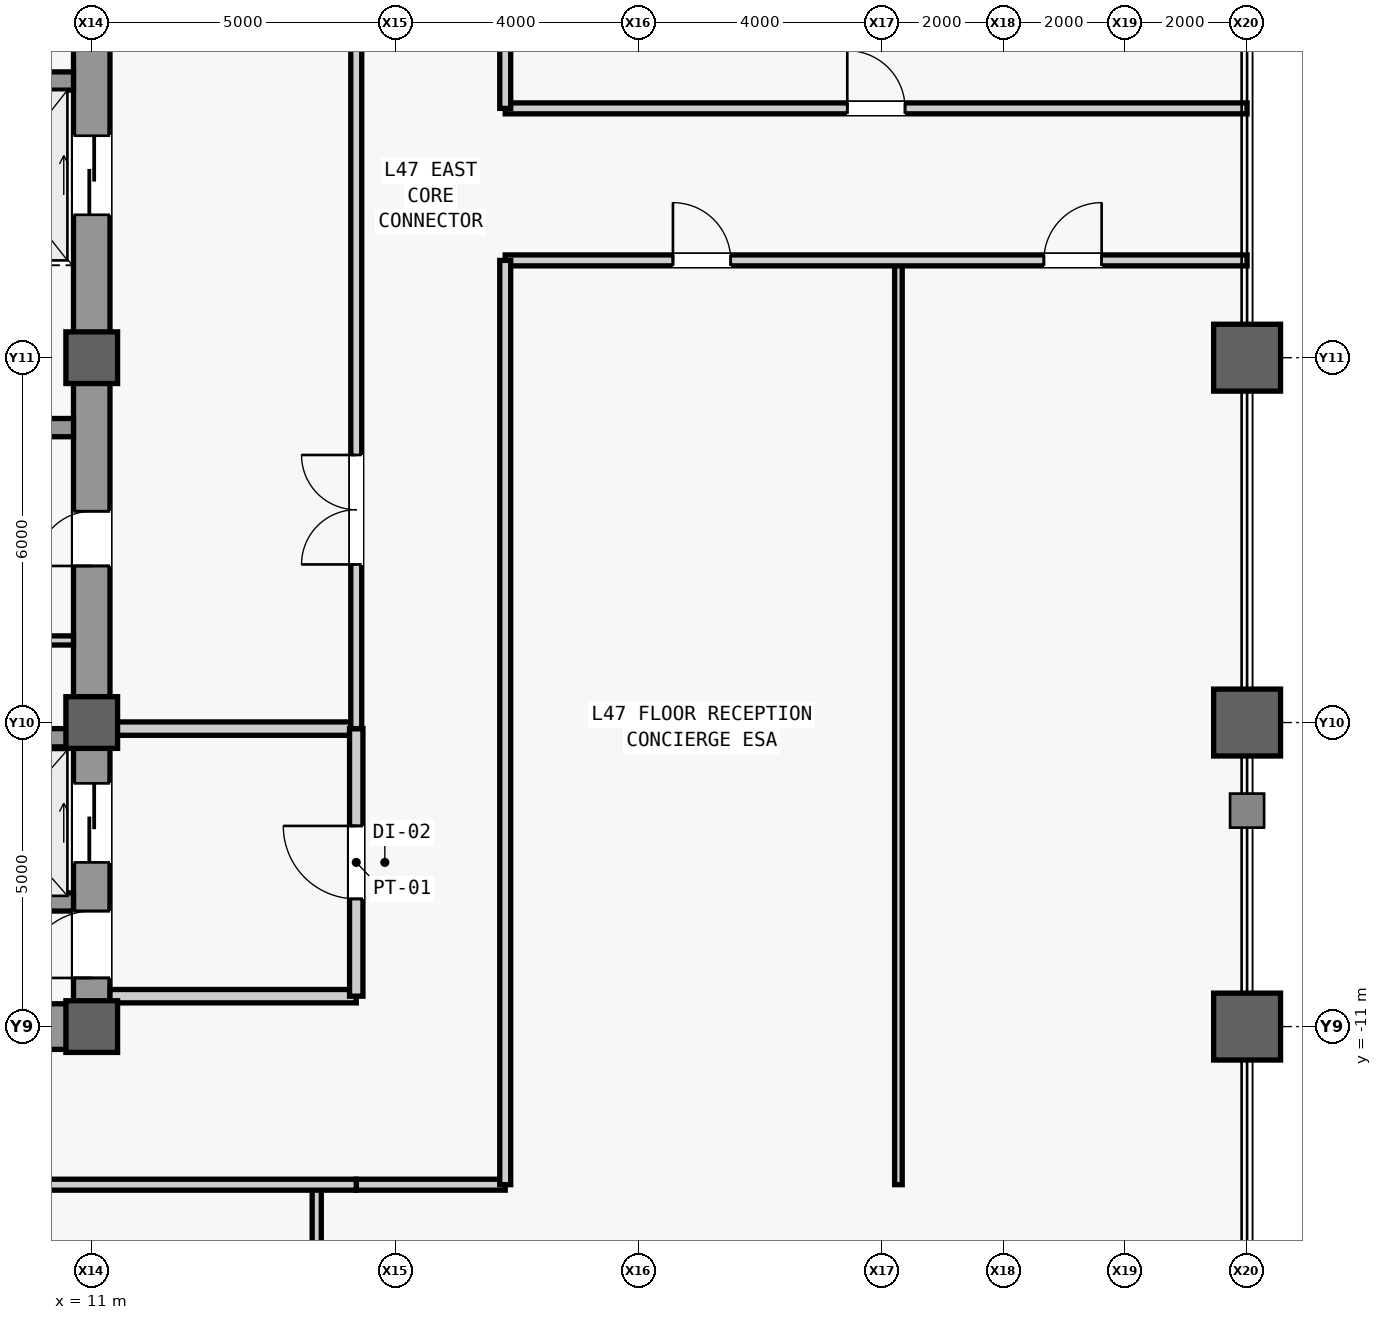
"""IFC4 building model, lengths in metres.
Left out: names, types, materials, properties, quantities, classifications, styles, units other than length and angle.
Written with IfcOpenShell. Run it as: python <this file> out.ifc"""

import sys

from ifc_helpers import new_model, si_unit, direction, frame, frame_2d, origin, origin_2d, place, context, subcontext, project, spatial, rectangle, hollow_rectangle, extrude, source, transform, mapped, element, fill, save


model = new_model("IFC4")
c1 = context("Model", 3, precision=1e-05, world=origin(), true_north=direction((0.0, 1.0)))
c2 = subcontext(c1, "Body", "Model", "MODEL_VIEW")
j1 = project(units=[si_unit("LENGTHUNIT", "METRE"), si_unit("PLANEANGLEUNIT", "RADIAN")], contexts=[c1])
p1 = place(None, origin())
s1 = spatial("IfcSite", under=j1, at=p1, CompositionType="ELEMENT")
p2 = place(p1, origin())
s2 = spatial("IfcBuilding", under=s1, at=p2, CompositionType="ELEMENT")
p3 = place(p2, frame((0.0, 0.0, 203.1)))
s3 = spatial("IfcBuildingStorey", under=s2, at=p3, CompositionType="ELEMENT", Elevation=203.1)
m1 = source(origin(), c2, "Body", "SweptSolid", [
    extrude(rectangle(XDim=22.0, YDim=0.6, at=frame_2d((11.0, 0.0))), origin(), (0.0, 0.0, 1.0), 3.78),
])
p4 = place(p3, frame((11.0, -11.0, 0.0), z_axis=(0.0, 0.0, 1.0), x_axis=(0.0, 1.0, 0.0)))
e1 = element("IfcWall", 1, at=p4, inside=s3, PredefinedType="SHEAR", context=c2, shape_type="MappedRepresentation", body=[
    mapped(m1, transform((0.0, 0.0, 0.0), scale=1.0)),
])
m2 = source(origin(), c2, "Body", "SweptSolid", [
    extrude(rectangle(XDim=1.1, YDim=2.2, at=frame_2d((0.55, 1.1))), frame((0.0, 0.31, 0.0), z_axis=(0.0, -1.0, 0.0), x_axis=(1.0, 0.0, 0.0)), (0.0, 0.0, 1.0), 0.62),
])
p5 = place(p4, frame((0.8, 0.0, 0.0)))
e2 = element("IfcOpeningElement", 2, at=p5, cuts=e1, PredefinedType="OPENING", context=c2, shape_type="MappedRepresentation", body=[
    mapped(m2, transform((0.0, 0.0, 0.0), scale=1.0)),
])
m3 = source(origin(), c2, "Body", "SweptSolid", [
    extrude(rectangle(XDim=0.9, YDim=2.15, at=frame_2d((0.45, 1.075))), frame((0.0, 0.31, 0.0), z_axis=(0.0, -1.0, 0.0), x_axis=(1.0, 0.0, 0.0)), (0.0, 0.0, 1.0), 0.62),
])
p6 = place(p4, frame((7.575, 0.0, 0.0)))
e3 = element("IfcOpeningElement", 3, at=p6, cuts=e1, PredefinedType="OPENING", context=c2, shape_type="MappedRepresentation", body=[
    mapped(m3, transform((0.0, 0.0, 0.0), scale=1.0)),
])
m4 = source(origin(), c2, "Body", "SweptSolid", [
    extrude(rectangle(XDim=1.3, YDim=2.3, at=frame_2d((0.65, 1.15))), frame((0.0, 0.31, 0.0), z_axis=(0.0, -1.0, 0.0), x_axis=(1.0, 0.0, 0.0)), (0.0, 0.0, 1.0), 0.62),
])
p7 = place(p4, frame((2.7, 0.0, 0.0)))
e4 = element("IfcOpeningElement", 4, at=p7, cuts=e1, PredefinedType="OPENING", context=c2, shape_type="MappedRepresentation", body=[
    mapped(m4, transform((0.0, 0.0, 0.0), scale=1.0)),
])
p8 = place(p4, frame((13.35, 0.0, 0.0)))
e5 = element("IfcOpeningElement", 5, at=p8, cuts=e1, PredefinedType="OPENING", context=c2, shape_type="MappedRepresentation", body=[
    mapped(m4, transform((0.0, 0.0, 0.0), scale=1.0)),
])
m5 = source(origin(), c2, "Body", "SweptSolid", [
    extrude(rectangle(XDim=5.85, YDim=0.75, at=frame_2d((2.925, 0.0))), origin(), (0.0, 0.0, 1.0), 3.78),
])
p9 = place(p3, frame((4.85, -11.0, 0.0), z_axis=(0.0, 0.0, 1.0), x_axis=(1.0, 0.0, 0.0)))
e6 = element("IfcWall", 6, at=p9, inside=s3, PredefinedType="SHEAR", context=c2, shape_type="MappedRepresentation", body=[
    mapped(m5, transform((0.0, 0.0, 0.0), scale=1.0)),
])
m6 = source(origin(), c2, "Body", "SweptSolid", [
    extrude(rectangle(XDim=5.6, YDim=0.3, at=frame_2d((2.8, 0.0))), origin(), (0.0, 0.0, 1.0), 3.78),
])
p10 = place(p3, frame((5.1, -1.15, 0.0), z_axis=(0.0, 0.0, 1.0), x_axis=(1.0, 0.0, 0.0)))
e7 = element("IfcWall", 7, at=p10, inside=s3, PredefinedType="SHEAR", context=c2, shape_type="MappedRepresentation", body=[
    mapped(m6, transform((0.0, 0.0, 0.0), scale=1.0)),
])
m7 = source(origin(), c2, "Body", "SweptSolid", [
    extrude(rectangle(XDim=0.85, YDim=0.85, at=origin_2d()), origin(), (0.0, 0.0, 1.0), 4.0),
])
for number, where, z_axis, x_axis in (
    (8, (11.0, -11.0, 0.0), (0.0, 0.0, 1.0), (1.0, 0.0, 0.0)),
    (9, (11.0, -6.0, 0.0), (0.0, 0.0, 1.0), (1.0, 0.0, 0.0)),
    (10, (11.0, 0.0, 0.0), (0.0, 0.0, 1.0), (1.0, 0.0, 0.0)),
):
    element("IfcColumn", number, at=place(p3, frame(where, z_axis=z_axis, x_axis=x_axis)), inside=s3, PredefinedType="COLUMN", context=c2, shape_type="MappedRepresentation", body=[
        mapped(m7, transform((0.0, 0.0, 0.0), scale=1.0)),
    ])
m8 = source(origin(), c2, "Body", "SweptSolid", [
    extrude(hollow_rectangle(XDim=1.1, YDim=1.1, WallThickness=0.06, at=origin_2d()), origin(), (0.0, 0.0, 1.0), 4.0),
])
for number, where, z_axis, x_axis in (
    (11, (30.0, -11.0, 0.0), (0.0, 0.0, 1.0), (1.0, 0.0, 0.0)),
    (12, (30.0, -6.0, 0.0), (0.0, 0.0, 1.0), (1.0, 0.0, 0.0)),
    (13, (30.0, 0.0, 0.0), (0.0, 0.0, 1.0), (1.0, 0.0, 0.0)),
):
    element("IfcColumn", number, at=place(p3, frame(where, z_axis=z_axis, x_axis=x_axis)), inside=s3, PredefinedType="COLUMN", context=c2, shape_type="MappedRepresentation", body=[
        mapped(m8, transform((0.0, 0.0, 0.0), scale=1.0)),
    ])
m9 = source(origin(), c2, "Body", "SweptSolid", [
    extrude(rectangle(XDim=2.2, YDim=0.3, at=frame_2d((1.1, 0.0))), origin(), (0.0, 0.0, 1.0), 3.78),
])
for number, where, z_axis, x_axis in (
    (14, (8.5, -8.95, 0.0), (0.0, 0.0, 1.0), (1.0, 0.0, 0.0)),
    (15, (8.5, -6.25, 0.0), (0.0, 0.0, 1.0), (1.0, 0.0, 0.0)),
):
    element("IfcWall", number, at=place(p3, frame(where, z_axis=z_axis, x_axis=x_axis)), inside=s3, PredefinedType="SHEAR", context=c2, shape_type="MappedRepresentation", body=[
        mapped(m9, transform((0.0, 0.0, 0.0), scale=1.0)),
    ])
m10 = source(origin(), c2, "Body", "SweptSolid", [
    extrude(rectangle(XDim=2.3, YDim=0.3, at=frame_2d((1.15, 0.0))), origin(), (0.0, 0.0, 1.0), 3.78),
])
p11 = place(p3, frame((8.4, 4.55, 0.0), z_axis=(0.0, 0.0, 1.0), x_axis=(1.0, 0.0, 0.0)))
e16 = element("IfcWall", 16, at=p11, inside=s3, PredefinedType="SHEAR", context=c2, shape_type="MappedRepresentation", body=[
    mapped(m10, transform((0.0, 0.0, 0.0), scale=1.0)),
])
m11 = source(origin(), c2, "Body", "SweptSolid", [
    extrude(rectangle(XDim=2.05, YDim=0.15, at=frame_2d((1.025, 0.0))), origin(), (0.0, 0.0, 1.0), 3.78),
])
p12 = place(p3, frame((8.65, -4.65, 0.0), z_axis=(0.0, 0.0, 1.0), x_axis=(1.0, 0.0, 0.0)))
e17 = element("IfcWall", 17, at=p12, inside=s3, PredefinedType="PARTITIONING", context=c2, shape_type="MappedRepresentation", body=[
    mapped(m11, transform((0.0, 0.0, 0.0), scale=1.0)),
])
m12 = source(origin(), c2, "Body", "SweptSolid", [
    extrude(rectangle(XDim=4.05, YDim=0.22, at=frame_2d((2.025, 0.0))), origin(), (0.0, 0.0, 1.0), 3.78),
])
p13 = place(p3, frame((11.3, -10.5, 0.0), z_axis=(0.0, 0.0, 1.0), x_axis=(1.0, 0.0, 0.0)))
e18 = element("IfcWall", 18, at=p13, inside=s3, PredefinedType="PARTITIONING", context=c2, shape_type="MappedRepresentation", body=[
    mapped(m12, transform((0.0, 0.0, 0.0), scale=1.0)),
])
m13 = source(origin(), c2, "Body", "SweptSolid", [
    extrude(rectangle(XDim=4.05, YDim=0.22, at=frame_2d((2.025, 0.0))), origin(), (0.0, 0.0, 1.0), 3.007),
])
p14 = place(p3, frame((11.3, -6.1, 0.0), z_axis=(0.0, 0.0, 1.0), x_axis=(1.0, 0.0, 0.0)))
e19 = element("IfcWall", 19, at=p14, inside=s3, PredefinedType="PARTITIONING", context=c2, shape_type="MappedRepresentation", body=[
    mapped(m13, transform((0.0, 0.0, 0.0), scale=1.0)),
])
m14 = source(origin(), c2, "Body", "SweptSolid", [
    extrude(rectangle(XDim=4.4, YDim=0.22, at=frame_2d((2.2, 0.0))), origin(), (0.0, 0.0, 1.0), 3.78),
])
p15 = place(p3, frame((15.35, -10.5, 0.0), z_axis=(0.0, 0.0, 1.0), x_axis=(0.0, 1.0, 0.0)))
e20 = element("IfcWall", 20, at=p15, inside=s3, PredefinedType="PARTITIONING", context=c2, shape_type="MappedRepresentation", body=[
    mapped(m14, transform((0.0, 0.0, 0.0), scale=1.0)),
])
m15 = source(origin(), c2, "Body", "SweptSolid", [
    extrude(rectangle(XDim=1.2, YDim=2.2, at=frame_2d((0.6, 1.1))), frame((0.0, 0.12, 0.0), z_axis=(0.0, -1.0, 0.0), x_axis=(1.0, 0.0, 0.0)), (0.0, 0.0, 1.0), 0.24),
])
p16 = place(p15, frame((1.6, 0.0, 0.0)))
e21 = element("IfcOpeningElement", 21, at=p16, cuts=e20, PredefinedType="OPENING", context=c2, shape_type="MappedRepresentation", body=[
    mapped(m15, transform((0.0, 0.0, 0.0), scale=1.0)),
])
m16 = source(origin(), c2, "Body", "SweptSolid", [
    extrude(rectangle(XDim=16.6, YDim=0.18, at=frame_2d((8.3, 0.0))), origin(), (0.0, 0.0, 1.0), 3.78),
])
p17 = place(p3, frame((15.35, -6.1, 0.0), z_axis=(0.0, 0.0, 1.0), x_axis=(0.0, 1.0, 0.0)))
e22 = element("IfcWall", 22, at=p17, inside=s3, PredefinedType="PARTITIONING", context=c2, shape_type="MappedRepresentation", body=[
    mapped(m16, transform((0.0, 0.0, 0.0), scale=1.0)),
])
m17 = source(origin(), c2, "Body", "SweptSolid", [
    extrude(rectangle(XDim=1.8, YDim=2.25, at=frame_2d((0.9, 1.125))), frame((0.0, 0.1, 0.0), z_axis=(0.0, -1.0, 0.0), x_axis=(1.0, 0.0, 0.0)), (0.0, 0.0, 1.0), 0.2),
])
p18 = place(p17, frame((2.7, 0.0, 0.0)))
e23 = element("IfcOpeningElement", 23, at=p18, cuts=e22, PredefinedType="OPENING", context=c2, shape_type="MappedRepresentation", body=[
    mapped(m17, transform((0.0, 0.0, 0.0), scale=1.0)),
])
p19 = place(p17, frame((13.0, 0.0, 0.0)))
e24 = element("IfcOpeningElement", 24, at=p19, cuts=e22, PredefinedType="OPENING", context=c2, shape_type="MappedRepresentation", body=[
    mapped(m17, transform((0.0, 0.0, 0.0), scale=1.0)),
])
m18 = source(origin(), c2, "Body", "SweptSolid", [
    extrude(rectangle(XDim=2.45, YDim=0.18, at=frame_2d((1.225, 0.0))), origin(), (0.0, 0.0, 1.0), 3.78),
])
p20 = place(p3, frame((15.35, -13.6, 0.0), z_axis=(0.0, 0.0, 1.0), x_axis=(1.0, 0.0, 0.0)))
e25 = element("IfcWall", 25, at=p20, inside=s3, PredefinedType="PARTITIONING", context=c2, shape_type="MappedRepresentation", body=[
    mapped(m18, transform((0.0, 0.0, 0.0), scale=1.0)),
])
m19 = source(origin(), c2, "Body", "SweptSolid", [
    extrude(rectangle(XDim=16.4, YDim=0.15, at=frame_2d((8.2, 0.0))), origin(), (0.0, 0.0, 1.0), 3.78),
])
p21 = place(p3, frame((14.7, -30.0, 0.0), z_axis=(0.0, 0.0, 1.0), x_axis=(0.0, 1.0, 0.0)))
e26 = element("IfcWall", 26, at=p21, inside=s3, PredefinedType="PARTITIONING", context=c2, shape_type="MappedRepresentation", body=[
    mapped(m19, transform((0.0, 0.0, 0.0), scale=1.0)),
])
m20 = source(origin(), c2, "Body", "SweptSolid", [
    extrude(rectangle(XDim=0.95, YDim=2.15, at=frame_2d((0.475, 1.075))), frame((0.0, 0.085, 0.0), z_axis=(0.0, -1.0, 0.0), x_axis=(1.0, 0.0, 0.0)), (0.0, 0.0, 1.0), 0.17),
])
p22 = place(p21, frame((11.825, 0.0, 0.0)))
e27 = element("IfcOpeningElement", 27, at=p22, cuts=e26, PredefinedType="OPENING", context=c2, shape_type="MappedRepresentation", body=[
    mapped(m20, transform((0.0, 0.0, 0.0), scale=1.0)),
])
m21 = source(origin(), c2, "Body", "SweptSolid", [
    extrude(rectangle(XDim=11.45, YDim=0.18, at=frame_2d((5.725, 0.0))), origin(), (0.0, 0.0, 1.0), 3.78),
])
p23 = place(p3, frame((3.9, -13.6, 0.0), z_axis=(0.0, 0.0, 1.0), x_axis=(1.0, 0.0, 0.0)))
e28 = element("IfcWall", 28, at=p23, inside=s3, PredefinedType="PARTITIONING", context=c2, shape_type="MappedRepresentation", body=[
    mapped(m21, transform((0.0, 0.0, 0.0), scale=1.0)),
])
m22 = source(origin(), c2, "Body", "SweptSolid", [
    extrude(rectangle(XDim=15.2, YDim=0.125, at=frame_2d((7.6, 0.0))), origin(), (0.0, 0.0, 1.0), 3.78),
])
p24 = place(p3, frame((24.266, -13.6, 0.0), z_axis=(0.0, 0.0, 1.0), x_axis=(0.0, 1.0, 0.0)))
e29 = element("IfcWall", 29, at=p24, inside=s3, PredefinedType="PARTITIONING", context=c2, shape_type="MappedRepresentation", body=[
    mapped(m22, transform((0.0, 0.0, 0.0), scale=1.0)),
])
m23 = source(origin(), c2, "Body", "SweptSolid", [
    extrude(rectangle(XDim=12.2, YDim=0.18, at=frame_2d((6.1, 0.0))), origin(), (0.0, 0.0, 1.0), 3.78),
])
p25 = place(p3, frame((17.8, 1.6, 0.0), z_axis=(0.0, 0.0, 1.0), x_axis=(1.0, 0.0, 0.0)))
e30 = element("IfcWall", 30, at=p25, inside=s3, PredefinedType="PARTITIONING", context=c2, shape_type="MappedRepresentation", body=[
    mapped(m23, transform((0.0, 0.0, 0.0), scale=1.0)),
])
m24 = source(origin(), c2, "Body", "SweptSolid", [
    extrude(rectangle(XDim=0.95, YDim=2.15, at=frame_2d((0.475, 1.075))), frame((0.0, 0.1, 0.0), z_axis=(0.0, -1.0, 0.0), x_axis=(1.0, 0.0, 0.0)), (0.0, 0.0, 1.0), 0.2),
])
p26 = place(p25, frame((2.758, 0.0, 0.0)))
e31 = element("IfcOpeningElement", 31, at=p26, cuts=e30, PredefinedType="OPENING", context=c2, shape_type="MappedRepresentation", body=[
    mapped(m24, transform((0.0, 0.0, 0.0), scale=1.0)),
])
p27 = place(p25, frame((8.858, 0.0, 0.0)))
e32 = element("IfcOpeningElement", 32, at=p27, cuts=e30, PredefinedType="OPENING", context=c2, shape_type="MappedRepresentation", body=[
    mapped(m24, transform((0.0, 0.0, 0.0), scale=1.0)),
])
m25 = source(origin(), c2, "Body", "SweptSolid", [
    extrude(rectangle(XDim=15.2, YDim=0.18, at=frame_2d((7.6, 0.0))), origin(), (0.0, 0.0, 1.0), 3.78),
])
p28 = place(p3, frame((17.8, -13.6, 0.0), z_axis=(0.0, 0.0, 1.0), x_axis=(0.0, 1.0, 0.0)))
e33 = element("IfcWall", 33, at=p28, inside=s3, PredefinedType="PARTITIONING", context=c2, shape_type="MappedRepresentation", body=[
    mapped(m25, transform((0.0, 0.0, 0.0), scale=1.0)),
])
p29 = place(p3, frame((17.8, 4.1, 0.0), z_axis=(0.0, 0.0, 1.0), x_axis=(1.0, 0.0, 0.0)))
e34 = element("IfcWall", 34, at=p29, inside=s3, PredefinedType="PARTITIONING", context=c2, shape_type="MappedRepresentation", body=[
    mapped(m23, transform((0.0, 0.0, 0.0), scale=1.0)),
])
p30 = place(p29, frame((5.625, 0.0, 0.0)))
e35 = element("IfcOpeningElement", 35, at=p30, cuts=e34, PredefinedType="OPENING", context=c2, shape_type="MappedRepresentation", body=[
    mapped(m24, transform((0.0, 0.0, 0.0), scale=1.0)),
])
m26 = source(origin(), c2, "Body", "SweptSolid", [
    extrude(rectangle(XDim=10.0, YDim=0.18, at=frame_2d((5.0, 0.0))), origin(), (0.0, 0.0, 1.0), 3.78),
])
p31 = place(p3, frame((17.8, 4.1, 0.0), z_axis=(0.0, 0.0, 1.0), x_axis=(0.0, 1.0, 0.0)))
e36 = element("IfcWall", 36, at=p31, inside=s3, PredefinedType="PARTITIONING", context=c2, shape_type="MappedRepresentation", body=[
    mapped(m26, transform((0.0, 0.0, 0.0), scale=1.0)),
])
m27 = source(origin(), c2, "Body", "SweptSolid", [
    extrude(rectangle(XDim=1.1, YDim=2.2, at=frame_2d((0.55, 1.1))), frame((0.0, 0.025, 0.0), z_axis=(0.0, -1.0, 0.0), x_axis=(1.0, 0.0, 0.0)), (0.0, 0.0, 1.0), 0.05),
])
p32 = place(p5, origin())
e37 = element("IfcDoor", 37, at=p32, inside=s3, OperationType="SINGLE_SWING_LEFT", PredefinedType="DOOR", context=c2, shape_type="MappedRepresentation", body=[
    mapped(m27, transform((0.0, 0.0, 0.0), scale=1.0)),
])
fill(e2, e37)
m28 = source(origin(), c2, "Body", "SweptSolid", [
    extrude(rectangle(XDim=0.9, YDim=2.15, at=frame_2d((0.45, 1.075))), frame((0.0, 0.025, 0.0), z_axis=(0.0, -1.0, 0.0), x_axis=(1.0, 0.0, 0.0)), (0.0, 0.0, 1.0), 0.05),
])
p33 = place(p6, origin())
e38 = element("IfcDoor", 38, at=p33, inside=s3, OperationType="SINGLE_SWING_LEFT", PredefinedType="DOOR", context=c2, shape_type="MappedRepresentation", body=[
    mapped(m28, transform((0.0, 0.0, 0.0), scale=1.0)),
])
fill(e3, e38)
m29 = source(origin(), c2, "Body", "SweptSolid", [
    extrude(rectangle(XDim=1.2, YDim=2.2, at=frame_2d((0.6, 1.1))), frame((0.0, 0.025, 0.0), z_axis=(0.0, -1.0, 0.0), x_axis=(1.0, 0.0, 0.0)), (0.0, 0.0, 1.0), 0.05),
])
p34 = place(p16, origin())
e39 = element("IfcDoor", 39, at=p34, inside=s3, OperationType="SINGLE_SWING_RIGHT", PredefinedType="DOOR", context=c2, shape_type="MappedRepresentation", body=[
    mapped(m29, transform((0.0, 0.0, 0.0), scale=1.0)),
])
fill(e21, e39)
m30 = source(origin(), c2, "Body", "SweptSolid", [
    extrude(rectangle(XDim=1.8, YDim=2.25, at=frame_2d((0.9, 1.125))), frame((0.0, 0.025, 0.0), z_axis=(0.0, -1.0, 0.0), x_axis=(1.0, 0.0, 0.0)), (0.0, 0.0, 1.0), 0.05),
])
p35 = place(p18, origin())
e40 = element("IfcDoor", 40, at=p35, inside=s3, OperationType="SINGLE_SWING_RIGHT", PredefinedType="DOOR", context=c2, shape_type="MappedRepresentation", body=[
    mapped(m30, transform((0.0, 0.0, 0.0), scale=1.0)),
])
fill(e23, e40)
m31 = source(origin(), c2, "Body", "SweptSolid", [
    extrude(rectangle(XDim=0.95, YDim=2.15, at=frame_2d((0.475, 1.075))), frame((0.0, 0.025, 0.0), z_axis=(0.0, -1.0, 0.0), x_axis=(1.0, 0.0, 0.0)), (0.0, 0.0, 1.0), 0.05),
])
p36 = place(p26, origin())
e41 = element("IfcDoor", 41, at=p36, inside=s3, OperationType="SINGLE_SWING_LEFT", PredefinedType="DOOR", context=c2, shape_type="MappedRepresentation", body=[
    mapped(m31, transform((0.0, 0.0, 0.0), scale=1.0)),
])
fill(e31, e41)
p37 = place(p27, origin())
e42 = element("IfcDoor", 42, at=p37, inside=s3, OperationType="SINGLE_SWING_RIGHT", PredefinedType="DOOR", context=c2, shape_type="MappedRepresentation", body=[
    mapped(m31, transform((0.0, 0.0, 0.0), scale=1.0)),
])
fill(e32, e42)
p38 = place(p30, origin())
e43 = element("IfcDoor", 43, at=p38, inside=s3, OperationType="SINGLE_SWING_LEFT", PredefinedType="DOOR", context=c2, shape_type="MappedRepresentation", body=[
    mapped(m31, transform((0.0, 0.0, 0.0), scale=1.0)),
])
fill(e35, e43)
m32 = source(origin(), c2, "Body", "SweptSolid", [
    extrude(rectangle(XDim=1.3, YDim=2.3, at=frame_2d((0.65, 1.15))), frame((0.0, 0.025, 0.0), z_axis=(0.0, -1.0, 0.0), x_axis=(1.0, 0.0, 0.0)), (0.0, 0.0, 1.0), 0.05),
])
p39 = place(p7, origin())
e44 = element("IfcDoor", 44, at=p39, inside=s3, OperationType="SLIDING_TO_LEFT", PredefinedType="DOOR", context=c2, shape_type="MappedRepresentation", body=[
    mapped(m32, transform((0.0, 0.0, 0.0), scale=1.0)),
])
fill(e4, e44)
p40 = place(p8, origin())
e45 = element("IfcDoor", 45, at=p40, inside=s3, OperationType="SLIDING_TO_LEFT", PredefinedType="DOOR", context=c2, shape_type="MappedRepresentation", body=[
    mapped(m32, transform((0.0, 0.0, 0.0), scale=1.0)),
])
fill(e5, e45)
save(model, sys.argv[1])
